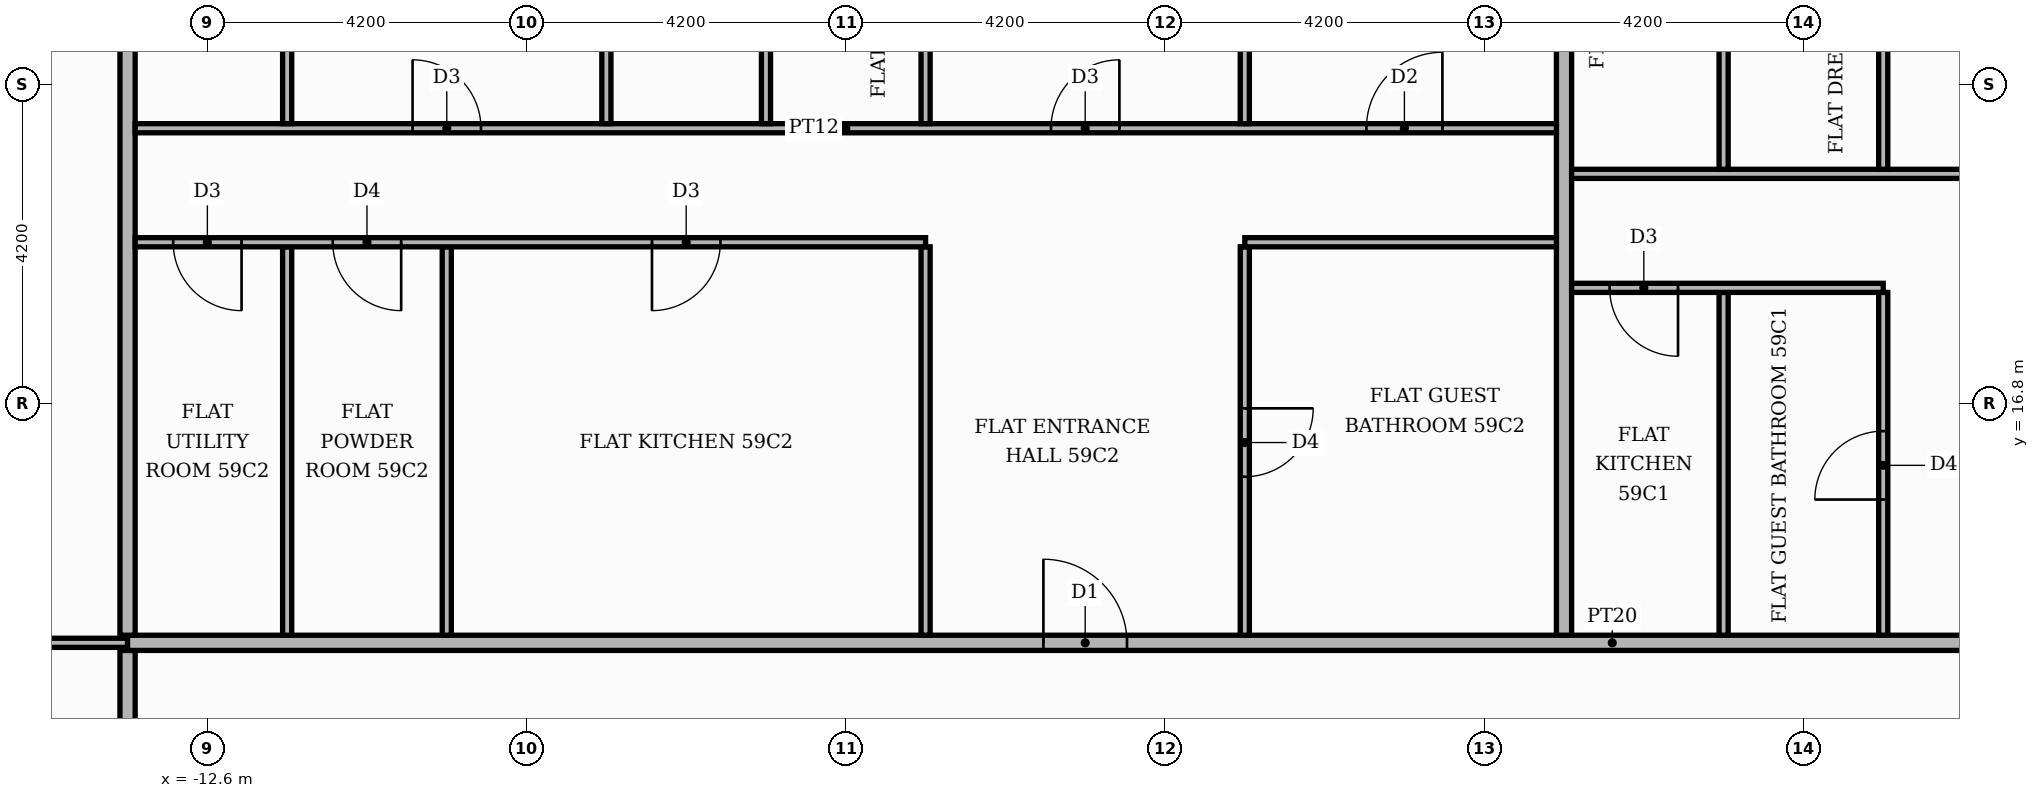
"""IFC4 building model, lengths in metres.
Left out: names, types, materials, properties, quantities, classifications, styles, units other than length and angle.
Written with IfcOpenShell. Run it as: python <this file> out.ifc"""

import sys

from ifc_helpers import new_model, si_unit, direction, frame, frame_2d, origin, place, context, subcontext, project, spatial, rectangle, extrude, element, fill, save


model = new_model("IFC4")
c1 = context("Model", 3, precision=1e-05, world=origin(), true_north=direction((0.0, 1.0)))
c2 = subcontext(c1, "Body", "Model", "MODEL_VIEW")
j1 = project(units=[si_unit("LENGTHUNIT", "METRE"), si_unit("PLANEANGLEUNIT", "RADIAN")], contexts=[c1])
p1 = place(None, origin())
s1 = spatial("IfcSite", under=j1, at=p1, CompositionType="ELEMENT")
p2 = place(p1, origin())
s2 = spatial("IfcBuilding", under=s1, at=p2, CompositionType="ELEMENT")
p3 = place(p2, frame((0.0, 0.0, 248.4)))
s3 = spatial("IfcBuildingStorey", under=s2, at=p3, CompositionType="ELEMENT", Elevation=248.4)
p4 = place(p3, frame((-13.65, 11.1, 0.0), z_axis=(0.0, 0.0, 1.0), x_axis=(0.0, 1.0, 0.0)))
e1 = element("IfcWall", 1, at=p4, inside=s3, PredefinedType="PARTITIONING", context=c2, shape_type="SweptSolid", body=[
    extrude(rectangle(XDim=2.45, YDim=0.2, at=frame_2d((1.225, 0.0))), origin(), (0.0, 0.0, 1.0), 3.48),
])
p5 = place(p3, frame((-19.82, 13.65, 0.0), z_axis=(0.0, 0.0, 1.0), x_axis=(1.0, 0.0, 0.0)))
e2 = element("IfcWall", 2, at=p5, inside=s3, PredefinedType="PARTITIONING", context=c2, shape_type="SweptSolid", body=[
    extrude(rectangle(XDim=6.17, YDim=0.12, at=frame_2d((3.085, 0.0))), origin(), (0.0, 0.0, 1.0), 3.48),
])
p6 = place(p5, frame((2.635, 0.0, 0.0)))
e3 = element("IfcOpeningElement", 3, at=p6, cuts=e2, PredefinedType="OPENING", context=c2, shape_type="SweptSolid", body=[
    extrude(rectangle(XDim=0.9, YDim=2.1, at=frame_2d((0.45, 1.05))), frame((0.0, 0.07, 0.0), z_axis=(0.0, -1.0, 0.0), x_axis=(1.0, 0.0, 0.0)), (0.0, 0.0, 1.0), 0.14),
])
p7 = place(p3, frame((-13.65, 13.65, 0.0), z_axis=(0.0, 0.0, 1.0), x_axis=(1.0, 0.0, 0.0)))
e4 = element("IfcWall", 4, at=p7, inside=s3, PredefinedType="PARTITIONING", context=c2, shape_type="SweptSolid", body=[
    extrude(rectangle(XDim=39.07, YDim=0.2, at=frame_2d((19.535, 0.0))), origin(), (0.0, 0.0, 1.0), 3.48),
])
p8 = place(p7, frame((24.65, 0.0, 0.0)))
e5 = element("IfcOpeningElement", 5, at=p8, cuts=e4, PredefinedType="OPENING", context=c2, shape_type="SweptSolid", body=[
    extrude(rectangle(XDim=1.1, YDim=2.4, at=frame_2d((0.55, 1.2))), frame((0.0, 0.11, 0.0), z_axis=(0.0, -1.0, 0.0), x_axis=(1.0, 0.0, 0.0)), (0.0, 0.0, 1.0), 0.22),
])
p9 = place(p7, frame((12.05, 0.0, 0.0)))
e6 = element("IfcOpeningElement", 6, at=p9, cuts=e4, PredefinedType="OPENING", context=c2, shape_type="SweptSolid", body=[
    extrude(rectangle(XDim=1.1, YDim=2.4, at=frame_2d((0.55, 1.2))), frame((0.0, 0.11, 0.0), z_axis=(0.0, -1.0, 0.0), x_axis=(1.0, 0.0, 0.0)), (0.0, 0.0, 1.0), 0.22),
])
p10 = place(p3, frame((-13.65, 13.75, 0.0), z_axis=(0.0, 0.0, 1.0), x_axis=(0.0, 1.0, 0.0)))
e7 = element("IfcWall", 7, at=p10, inside=s3, PredefinedType="PARTITIONING", context=c2, shape_type="SweptSolid", body=[
    extrude(rectangle(XDim=11.67, YDim=0.2, at=frame_2d((5.835, 0.0))), origin(), (0.0, 0.0, 1.0), 3.48),
])
for number, where, z_axis, x_axis in (
    (8, (-11.55, 13.75, 0.0), (0.0, 0.0, 1.0), (0.0, 1.0, 0.0)),
    (9, (-9.45, 13.75, 0.0), (0.0, 0.0, 1.0), (0.0, 1.0, 0.0)),
    (10, (-3.15, 13.75, 0.0), (0.0, 0.0, 1.0), (0.0, 1.0, 0.0)),
):
    element("IfcWall", number, at=place(p3, frame(where, z_axis=z_axis, x_axis=x_axis)), inside=s3, PredefinedType="PARTITIONING", context=c2, shape_type="SweptSolid", body=[
        extrude(rectangle(XDim=5.11, YDim=0.12, at=frame_2d((2.555, 0.0))), origin(), (0.0, 0.0, 1.0), 3.48),
    ])
p11 = place(p3, frame((1.05, 13.75, 0.0), z_axis=(0.0, 0.0, 1.0), x_axis=(0.0, 1.0, 0.0)))
e11 = element("IfcWall", 11, at=p11, inside=s3, PredefinedType="PARTITIONING", context=c2, shape_type="SweptSolid", body=[
    extrude(rectangle(XDim=5.11, YDim=0.12, at=frame_2d((2.555, 0.0))), origin(), (0.0, 0.0, 1.0), 3.48),
])
p12 = place(p11, frame((2.085, 0.0, 0.0)))
e12 = element("IfcOpeningElement", 12, at=p12, cuts=e11, PredefinedType="OPENING", context=c2, shape_type="SweptSolid", body=[
    extrude(rectangle(XDim=0.9, YDim=2.1, at=frame_2d((0.45, 1.05))), frame((0.0, 0.07, 0.0), z_axis=(0.0, -1.0, 0.0), x_axis=(1.0, 0.0, 0.0)), (0.0, 0.0, 1.0), 0.14),
])
p13 = place(p3, frame((5.25, 13.75, 0.0), z_axis=(0.0, 0.0, 1.0), x_axis=(0.0, 1.0, 0.0)))
e13 = element("IfcWall", 13, at=p13, inside=s3, PredefinedType="PARTITIONING", context=c2, shape_type="SweptSolid", body=[
    extrude(rectangle(XDim=11.67, YDim=0.2, at=frame_2d((5.835, 0.0))), origin(), (0.0, 0.0, 1.0), 3.48),
])
p14 = place(p3, frame((7.35, 13.75, 0.0), z_axis=(0.0, 0.0, 1.0), x_axis=(0.0, 1.0, 0.0)))
e14 = element("IfcWall", 14, at=p14, inside=s3, PredefinedType="PARTITIONING", context=c2, shape_type="SweptSolid", body=[
    extrude(rectangle(XDim=4.51, YDim=0.12, at=frame_2d((2.255, 0.0))), origin(), (0.0, 0.0, 1.0), 3.48),
])
p15 = place(p3, frame((9.45, 13.75, 0.0), z_axis=(0.0, 0.0, 1.0), x_axis=(0.0, 1.0, 0.0)))
e15 = element("IfcWall", 15, at=p15, inside=s3, PredefinedType="PARTITIONING", context=c2, shape_type="SweptSolid", body=[
    extrude(rectangle(XDim=4.51, YDim=0.12, at=frame_2d((2.255, 0.0))), origin(), (0.0, 0.0, 1.0), 3.48),
])
p16 = place(p15, frame((1.785, 0.0, 0.0)))
e16 = element("IfcOpeningElement", 16, at=p16, cuts=e15, PredefinedType="OPENING", context=c2, shape_type="SweptSolid", body=[
    extrude(rectangle(XDim=0.9, YDim=2.1, at=frame_2d((0.45, 1.05))), frame((0.0, 0.07, 0.0), z_axis=(0.0, -1.0, 0.0), x_axis=(1.0, 0.0, 0.0)), (0.0, 0.0, 1.0), 0.14),
])
p17 = place(p3, frame((5.35, 18.32, 0.0), z_axis=(0.0, 0.0, 1.0), x_axis=(1.0, 0.0, 0.0)))
e17 = element("IfcWall", 17, at=p17, inside=s3, PredefinedType="PARTITIONING", context=c2, shape_type="SweptSolid", body=[
    extrude(rectangle(XDim=4.1, YDim=0.12, at=frame_2d((2.05, 0.0))), origin(), (0.0, 0.0, 1.0), 3.48),
])
p18 = place(p17, frame((0.5, 0.0, 0.0)))
e18 = element("IfcOpeningElement", 18, at=p18, cuts=e17, PredefinedType="OPENING", context=c2, shape_type="SweptSolid", body=[
    extrude(rectangle(XDim=0.9, YDim=2.1, at=frame_2d((0.45, 1.05))), frame((0.0, 0.07, 0.0), z_axis=(0.0, -1.0, 0.0), x_axis=(1.0, 0.0, 0.0)), (0.0, 0.0, 1.0), 0.14),
])
p19 = place(p3, frame((-13.55, 18.92, 0.0), z_axis=(0.0, 0.0, 1.0), x_axis=(1.0, 0.0, 0.0)))
e19 = element("IfcWall", 19, at=p19, inside=s3, PredefinedType="PARTITIONING", context=c2, shape_type="SweptSolid", body=[
    extrude(rectangle(XDim=10.4, YDim=0.12, at=frame_2d((5.2, 0.0))), origin(), (0.0, 0.0, 1.0), 3.48),
])
p20 = place(p19, frame((6.8, 0.0, 0.0)))
e20 = element("IfcOpeningElement", 20, at=p20, cuts=e19, PredefinedType="OPENING", context=c2, shape_type="SweptSolid", body=[
    extrude(rectangle(XDim=0.9, YDim=2.1, at=frame_2d((0.45, 1.05))), frame((0.0, 0.07, 0.0), z_axis=(0.0, -1.0, 0.0), x_axis=(1.0, 0.0, 0.0)), (0.0, 0.0, 1.0), 0.14),
])
p21 = place(p19, frame((2.6, 0.0, 0.0)))
e21 = element("IfcOpeningElement", 21, at=p21, cuts=e19, PredefinedType="OPENING", context=c2, shape_type="SweptSolid", body=[
    extrude(rectangle(XDim=0.9, YDim=2.1, at=frame_2d((0.45, 1.05))), frame((0.0, 0.07, 0.0), z_axis=(0.0, -1.0, 0.0), x_axis=(1.0, 0.0, 0.0)), (0.0, 0.0, 1.0), 0.14),
])
p22 = place(p19, frame((0.5, 0.0, 0.0)))
e22 = element("IfcOpeningElement", 22, at=p22, cuts=e19, PredefinedType="OPENING", context=c2, shape_type="SweptSolid", body=[
    extrude(rectangle(XDim=0.9, YDim=2.1, at=frame_2d((0.45, 1.05))), frame((0.0, 0.07, 0.0), z_axis=(0.0, -1.0, 0.0), x_axis=(1.0, 0.0, 0.0)), (0.0, 0.0, 1.0), 0.14),
])
p23 = place(p3, frame((1.05, 18.92, 0.0), z_axis=(0.0, 0.0, 1.0), x_axis=(1.0, 0.0, 0.0)))
e23 = element("IfcWall", 23, at=p23, inside=s3, PredefinedType="PARTITIONING", context=c2, shape_type="SweptSolid", body=[
    extrude(rectangle(XDim=4.1, YDim=0.12, at=frame_2d((2.05, 0.0))), origin(), (0.0, 0.0, 1.0), 3.48),
])
p24 = place(p3, frame((5.35, 19.82, 0.0), z_axis=(0.0, 0.0, 1.0), x_axis=(1.0, 0.0, 0.0)))
e24 = element("IfcWall", 24, at=p24, inside=s3, PredefinedType="PARTITIONING", context=c2, shape_type="SweptSolid", body=[
    extrude(rectangle(XDim=12.35, YDim=0.12, at=frame_2d((6.175, 0.0))), origin(), (0.0, 0.0, 1.0), 3.48),
])
p25 = place(p24, frame((8.85, 0.0, 0.0)))
e25 = element("IfcOpeningElement", 25, at=p25, cuts=e24, PredefinedType="OPENING", context=c2, shape_type="SweptSolid", body=[
    extrude(rectangle(XDim=1.0, YDim=2.1, at=frame_2d((0.5, 1.05))), frame((0.0, 0.07, 0.0), z_axis=(0.0, -1.0, 0.0), x_axis=(1.0, 0.0, 0.0)), (0.0, 0.0, 1.0), 0.14),
])
p26 = place(p24, frame((5.75, 0.0, 0.0)))
e26 = element("IfcOpeningElement", 26, at=p26, cuts=e24, PredefinedType="OPENING", context=c2, shape_type="SweptSolid", body=[
    extrude(rectangle(XDim=0.9, YDim=2.1, at=frame_2d((0.45, 1.05))), frame((0.0, 0.07, 0.0), z_axis=(0.0, -1.0, 0.0), x_axis=(1.0, 0.0, 0.0)), (0.0, 0.0, 1.0), 0.14),
])
p27 = place(p3, frame((7.35, 19.88, 0.0), z_axis=(0.0, 0.0, 1.0), x_axis=(0.0, 1.0, 0.0)))
e27 = element("IfcWall", 27, at=p27, inside=s3, PredefinedType="PARTITIONING", context=c2, shape_type="SweptSolid", body=[
    extrude(rectangle(XDim=5.54, YDim=0.12, at=frame_2d((2.77, 0.0))), origin(), (0.0, 0.0, 1.0), 3.48),
])
p28 = place(p27, frame((2.44, 0.0, 0.0)))
e28 = element("IfcOpeningElement", 28, at=p28, cuts=e27, PredefinedType="OPENING", context=c2, shape_type="SweptSolid", body=[
    extrude(rectangle(XDim=0.9, YDim=2.1, at=frame_2d((0.45, 1.05))), frame((0.0, 0.07, 0.0), z_axis=(0.0, -1.0, 0.0), x_axis=(1.0, 0.0, 0.0)), (0.0, 0.0, 1.0), 0.14),
])
p29 = place(p3, frame((9.45, 19.88, 0.0), z_axis=(0.0, 0.0, 1.0), x_axis=(0.0, 1.0, 0.0)))
e29 = element("IfcWall", 29, at=p29, inside=s3, PredefinedType="PARTITIONING", context=c2, shape_type="SweptSolid", body=[
    extrude(rectangle(XDim=5.54, YDim=0.12, at=frame_2d((2.77, 0.0))), origin(), (0.0, 0.0, 1.0), 3.48),
])
p30 = place(p29, frame((2.44, 0.0, 0.0)))
e30 = element("IfcOpeningElement", 30, at=p30, cuts=e29, PredefinedType="OPENING", context=c2, shape_type="SweptSolid", body=[
    extrude(rectangle(XDim=0.9, YDim=2.1, at=frame_2d((0.45, 1.05))), frame((0.0, 0.07, 0.0), z_axis=(0.0, -1.0, 0.0), x_axis=(1.0, 0.0, 0.0)), (0.0, 0.0, 1.0), 0.14),
])
p31 = place(p3, frame((-13.55, 20.42, 0.0), z_axis=(0.0, 0.0, 1.0), x_axis=(1.0, 0.0, 0.0)))
e31 = element("IfcWall", 31, at=p31, inside=s3, PredefinedType="PARTITIONING", context=c2, shape_type="SweptSolid", body=[
    extrude(rectangle(XDim=18.7, YDim=0.12, at=frame_2d((9.35, 0.0))), origin(), (0.0, 0.0, 1.0), 3.48),
])
p32 = place(p31, frame((16.2, 0.0, 0.0)))
e32 = element("IfcOpeningElement", 32, at=p32, cuts=e31, PredefinedType="OPENING", context=c2, shape_type="SweptSolid", body=[
    extrude(rectangle(XDim=1.0, YDim=2.1, at=frame_2d((0.5, 1.05))), frame((0.0, 0.07, 0.0), z_axis=(0.0, -1.0, 0.0), x_axis=(1.0, 0.0, 0.0)), (0.0, 0.0, 1.0), 0.14),
])
p33 = place(p31, frame((12.05, 0.0, 0.0)))
e33 = element("IfcOpeningElement", 33, at=p33, cuts=e31, PredefinedType="OPENING", context=c2, shape_type="SweptSolid", body=[
    extrude(rectangle(XDim=0.9, YDim=2.1, at=frame_2d((0.45, 1.05))), frame((0.0, 0.07, 0.0), z_axis=(0.0, -1.0, 0.0), x_axis=(1.0, 0.0, 0.0)), (0.0, 0.0, 1.0), 0.14),
])
p34 = place(p31, frame((3.65, 0.0, 0.0)))
e34 = element("IfcOpeningElement", 34, at=p34, cuts=e31, PredefinedType="OPENING", context=c2, shape_type="SweptSolid", body=[
    extrude(rectangle(XDim=0.9, YDim=2.1, at=frame_2d((0.45, 1.05))), frame((0.0, 0.07, 0.0), z_axis=(0.0, -1.0, 0.0), x_axis=(1.0, 0.0, 0.0)), (0.0, 0.0, 1.0), 0.14),
])
p35 = place(p3, frame((-11.55, 20.48, 0.0), z_axis=(0.0, 0.0, 1.0), x_axis=(0.0, 1.0, 0.0)))
e35 = element("IfcWall", 35, at=p35, inside=s3, PredefinedType="PARTITIONING", context=c2, shape_type="SweptSolid", body=[
    extrude(rectangle(XDim=4.94, YDim=0.12, at=frame_2d((2.47, 0.0))), origin(), (0.0, 0.0, 1.0), 3.48),
])
p36 = place(p35, frame((2.14, 0.0, 0.0)))
e36 = element("IfcOpeningElement", 36, at=p36, cuts=e35, PredefinedType="OPENING", context=c2, shape_type="SweptSolid", body=[
    extrude(rectangle(XDim=0.9, YDim=2.1, at=frame_2d((0.45, 1.05))), frame((0.0, 0.07, 0.0), z_axis=(0.0, -1.0, 0.0), x_axis=(1.0, 0.0, 0.0)), (0.0, 0.0, 1.0), 0.14),
])
p37 = place(p3, frame((-7.35, 20.48, 0.0), z_axis=(0.0, 0.0, 1.0), x_axis=(0.0, 1.0, 0.0)))
e37 = element("IfcWall", 37, at=p37, inside=s3, PredefinedType="PARTITIONING", context=c2, shape_type="SweptSolid", body=[
    extrude(rectangle(XDim=4.94, YDim=0.12, at=frame_2d((2.47, 0.0))), origin(), (0.0, 0.0, 1.0), 3.48),
])
p38 = place(p3, frame((-5.25, 20.48, 0.0), z_axis=(0.0, 0.0, 1.0), x_axis=(0.0, 1.0, 0.0)))
e38 = element("IfcWall", 38, at=p38, inside=s3, PredefinedType="PARTITIONING", context=c2, shape_type="SweptSolid", body=[
    extrude(rectangle(XDim=4.94, YDim=0.12, at=frame_2d((2.47, 0.0))), origin(), (0.0, 0.0, 1.0), 3.48),
])
p39 = place(p38, frame((2.14, 0.0, 0.0)))
e39 = element("IfcOpeningElement", 39, at=p39, cuts=e38, PredefinedType="OPENING", context=c2, shape_type="SweptSolid", body=[
    extrude(rectangle(XDim=0.9, YDim=2.1, at=frame_2d((0.45, 1.05))), frame((0.0, 0.07, 0.0), z_axis=(0.0, -1.0, 0.0), x_axis=(1.0, 0.0, 0.0)), (0.0, 0.0, 1.0), 0.14),
])
p40 = place(p3, frame((-3.15, 20.48, 0.0), z_axis=(0.0, 0.0, 1.0), x_axis=(0.0, 1.0, 0.0)))
e40 = element("IfcWall", 40, at=p40, inside=s3, PredefinedType="PARTITIONING", context=c2, shape_type="SweptSolid", body=[
    extrude(rectangle(XDim=4.94, YDim=0.12, at=frame_2d((2.47, 0.0))), origin(), (0.0, 0.0, 1.0), 3.48),
])
p41 = place(p40, frame((2.14, 0.0, 0.0)))
e41 = element("IfcOpeningElement", 41, at=p41, cuts=e40, PredefinedType="OPENING", context=c2, shape_type="SweptSolid", body=[
    extrude(rectangle(XDim=0.9, YDim=2.1, at=frame_2d((0.45, 1.05))), frame((0.0, 0.07, 0.0), z_axis=(0.0, -1.0, 0.0), x_axis=(1.0, 0.0, 0.0)), (0.0, 0.0, 1.0), 0.14),
])
p42 = place(p3, frame((1.05, 20.48, 0.0), z_axis=(0.0, 0.0, 1.0), x_axis=(0.0, 1.0, 0.0)))
e42 = element("IfcWall", 42, at=p42, inside=s3, PredefinedType="PARTITIONING", context=c2, shape_type="SweptSolid", body=[
    extrude(rectangle(XDim=4.94, YDim=0.12, at=frame_2d((2.47, 0.0))), origin(), (0.0, 0.0, 1.0), 3.48),
])
p43 = place(p16, origin())
e43 = element("IfcDoor", 43, at=p43, inside=s3, OperationType="SINGLE_SWING_LEFT", PredefinedType="DOOR", context=c2, shape_type="SweptSolid", body=[
    extrude(rectangle(XDim=0.9, YDim=2.1, at=frame_2d((0.45, 1.05))), frame((0.0, 0.025, 0.0), z_axis=(0.0, -1.0, 0.0), x_axis=(1.0, 0.0, 0.0)), (0.0, 0.0, 1.0), 0.05),
])
fill(e16, e43)
p44 = place(p18, frame((0.9, 0.0, 0.0), z_axis=(0.0, 0.0, 1.0), x_axis=(-1.0, 0.0, 0.0)))
e44 = element("IfcDoor", 44, at=p44, inside=s3, OperationType="SINGLE_SWING_RIGHT", PredefinedType="DOOR", context=c2, shape_type="SweptSolid", body=[
    extrude(rectangle(XDim=0.9, YDim=2.1, at=frame_2d((0.45, 1.05))), frame((0.0, 0.025, 0.0), z_axis=(0.0, -1.0, 0.0), x_axis=(1.0, 0.0, 0.0)), (0.0, 0.0, 1.0), 0.05),
])
fill(e18, e44)
p45 = place(p9, origin())
e45 = element("IfcDoor", 45, at=p45, inside=s3, OperationType="SINGLE_SWING_LEFT", PredefinedType="DOOR", context=c2, shape_type="SweptSolid", body=[
    extrude(rectangle(XDim=1.1, YDim=2.4, at=frame_2d((0.55, 1.2))), frame((0.0, 0.025, 0.0), z_axis=(0.0, -1.0, 0.0), x_axis=(1.0, 0.0, 0.0)), (0.0, 0.0, 1.0), 0.05),
])
fill(e6, e45)
p46 = place(p12, frame((0.9, 0.0, 0.0), z_axis=(0.0, 0.0, 1.0), x_axis=(-1.0, 0.0, 0.0)))
e46 = element("IfcDoor", 46, at=p46, inside=s3, OperationType="SINGLE_SWING_RIGHT", PredefinedType="DOOR", context=c2, shape_type="SweptSolid", body=[
    extrude(rectangle(XDim=0.9, YDim=2.1, at=frame_2d((0.45, 1.05))), frame((0.0, 0.025, 0.0), z_axis=(0.0, -1.0, 0.0), x_axis=(1.0, 0.0, 0.0)), (0.0, 0.0, 1.0), 0.05),
])
fill(e12, e46)
p47 = place(p20, frame((0.9, 0.0, 0.0), z_axis=(0.0, 0.0, 1.0), x_axis=(-1.0, 0.0, 0.0)))
e47 = element("IfcDoor", 47, at=p47, inside=s3, OperationType="SINGLE_SWING_LEFT", PredefinedType="DOOR", context=c2, shape_type="SweptSolid", body=[
    extrude(rectangle(XDim=0.9, YDim=2.1, at=frame_2d((0.45, 1.05))), frame((0.0, 0.025, 0.0), z_axis=(0.0, -1.0, 0.0), x_axis=(1.0, 0.0, 0.0)), (0.0, 0.0, 1.0), 0.05),
])
fill(e20, e47)
p48 = place(p21, frame((0.9, 0.0, 0.0), z_axis=(0.0, 0.0, 1.0), x_axis=(-1.0, 0.0, 0.0)))
e48 = element("IfcDoor", 48, at=p48, inside=s3, OperationType="SINGLE_SWING_RIGHT", PredefinedType="DOOR", context=c2, shape_type="SweptSolid", body=[
    extrude(rectangle(XDim=0.9, YDim=2.1, at=frame_2d((0.45, 1.05))), frame((0.0, 0.025, 0.0), z_axis=(0.0, -1.0, 0.0), x_axis=(1.0, 0.0, 0.0)), (0.0, 0.0, 1.0), 0.05),
])
fill(e21, e48)
p49 = place(p22, frame((0.9, 0.0, 0.0), z_axis=(0.0, 0.0, 1.0), x_axis=(-1.0, 0.0, 0.0)))
e49 = element("IfcDoor", 49, at=p49, inside=s3, OperationType="SINGLE_SWING_RIGHT", PredefinedType="DOOR", context=c2, shape_type="SweptSolid", body=[
    extrude(rectangle(XDim=0.9, YDim=2.1, at=frame_2d((0.45, 1.05))), frame((0.0, 0.025, 0.0), z_axis=(0.0, -1.0, 0.0), x_axis=(1.0, 0.0, 0.0)), (0.0, 0.0, 1.0), 0.05),
])
fill(e22, e49)
p50 = place(p32, origin())
e50 = element("IfcDoor", 50, at=p50, inside=s3, OperationType="SINGLE_SWING_RIGHT", PredefinedType="DOOR", context=c2, shape_type="SweptSolid", body=[
    extrude(rectangle(XDim=1.0, YDim=2.1, at=frame_2d((0.5, 1.05))), frame((0.0, 0.025, 0.0), z_axis=(0.0, -1.0, 0.0), x_axis=(1.0, 0.0, 0.0)), (0.0, 0.0, 1.0), 0.05),
])
fill(e32, e50)
p51 = place(p33, origin())
e51 = element("IfcDoor", 51, at=p51, inside=s3, OperationType="SINGLE_SWING_RIGHT", PredefinedType="DOOR", context=c2, shape_type="SweptSolid", body=[
    extrude(rectangle(XDim=0.9, YDim=2.1, at=frame_2d((0.45, 1.05))), frame((0.0, 0.025, 0.0), z_axis=(0.0, -1.0, 0.0), x_axis=(1.0, 0.0, 0.0)), (0.0, 0.0, 1.0), 0.05),
])
fill(e33, e51)
p52 = place(p34, origin())
e52 = element("IfcDoor", 52, at=p52, inside=s3, OperationType="SINGLE_SWING_LEFT", PredefinedType="DOOR", context=c2, shape_type="SweptSolid", body=[
    extrude(rectangle(XDim=0.9, YDim=2.1, at=frame_2d((0.45, 1.05))), frame((0.0, 0.025, 0.0), z_axis=(0.0, -1.0, 0.0), x_axis=(1.0, 0.0, 0.0)), (0.0, 0.0, 1.0), 0.05),
])
fill(e34, e52)
save(model, sys.argv[1])
